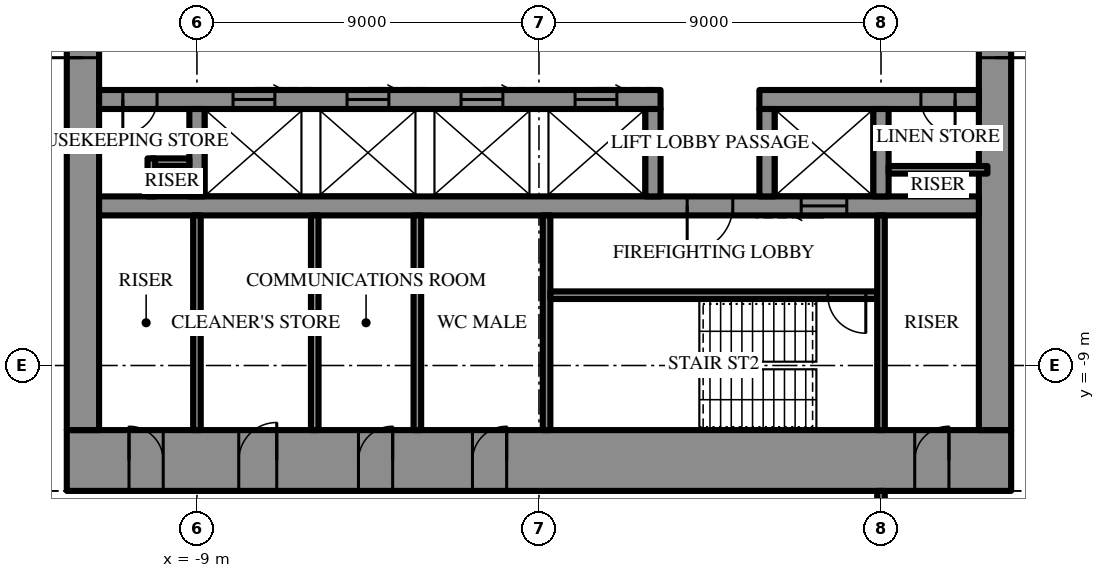
"""IFC4 building model, lengths in metres.
Left out: names, types, materials, properties, quantities, classifications, styles, units other than length and angle.
Written with IfcOpenShell. Run it as: python <this file> out.ifc"""

import sys

from ifc_helpers import new_model, si_unit, direction, frame, frame_2d, origin, place, context, subcontext, project, spatial, rectangle, extrude, element, fill, save


model = new_model("IFC4")
c1 = context("Model", 3, precision=1e-05, world=origin(), true_north=direction((0.0, 1.0)))
c2 = subcontext(c1, "Body", "Model", "MODEL_VIEW")
j1 = project(units=[si_unit("LENGTHUNIT", "METRE"), si_unit("PLANEANGLEUNIT", "RADIAN")], contexts=[c1])
p1 = place(None, origin())
s1 = spatial("IfcSite", under=j1, at=p1, CompositionType="ELEMENT")
p2 = place(p1, origin())
s2 = spatial("IfcBuilding", under=s1, at=p2, CompositionType="ELEMENT")
p3 = place(p2, frame((0.0, 0.0, 311.5)))
s3 = spatial("IfcBuildingStorey", under=s2, at=p3, CompositionType="ELEMENT", Elevation=311.5)
p4 = place(p3, frame((12.425, -11.5, 0.0), z_axis=(0.0, 0.0, 1.0), x_axis=(-1.0, 0.0, 0.0)))
e1 = element("IfcWall", 1, at=p4, inside=s3, PredefinedType="SHEAR", context=c2, shape_type="SweptSolid", body=[
    extrude(rectangle(XDim=24.85, YDim=1.6, at=frame_2d((12.425, 0.0))), origin(), (0.0, 0.0, 1.0), 4.2),
])
p5 = place(p4, frame((13.275, 0.0, 0.0)))
e2 = element("IfcOpeningElement", 2, at=p5, cuts=e1, PredefinedType="OPENING", context=c2, shape_type="SweptSolid", body=[
    extrude(rectangle(XDim=0.9, YDim=2.2, at=frame_2d((0.45, 1.1))), frame((0.0, 0.81, 0.0), z_axis=(0.0, -1.0, 0.0), x_axis=(1.0, 0.0, 0.0)), (0.0, 0.0, 1.0), 1.62),
])
p6 = place(p4, frame((16.275, 0.0, 0.0)))
e3 = element("IfcOpeningElement", 3, at=p6, cuts=e1, PredefinedType="OPENING", context=c2, shape_type="SweptSolid", body=[
    extrude(rectangle(XDim=0.9, YDim=2.2, at=frame_2d((0.45, 1.1))), frame((0.0, 0.81, 0.0), z_axis=(0.0, -1.0, 0.0), x_axis=(1.0, 0.0, 0.0)), (0.0, 0.0, 1.0), 1.62),
])
p7 = place(p4, frame((19.325, 0.0, 0.0)))
e4 = element("IfcOpeningElement", 4, at=p7, cuts=e1, PredefinedType="OPENING", context=c2, shape_type="SweptSolid", body=[
    extrude(rectangle(XDim=1.0, YDim=2.2, at=frame_2d((0.5, 1.1))), frame((0.0, 0.81, 0.0), z_axis=(0.0, -1.0, 0.0), x_axis=(1.0, 0.0, 0.0)), (0.0, 0.0, 1.0), 1.62),
])
p8 = place(p4, frame((1.637, 0.0, 0.0)))
e5 = element("IfcOpeningElement", 5, at=p8, cuts=e1, PredefinedType="OPENING", context=c2, shape_type="SweptSolid", body=[
    extrude(rectangle(XDim=0.9, YDim=2.2, at=frame_2d((0.45, 1.1))), frame((0.0, 0.81, 0.0), z_axis=(0.0, -1.0, 0.0), x_axis=(1.0, 0.0, 0.0)), (0.0, 0.0, 1.0), 1.62),
])
p9 = place(p4, frame((22.312, 0.0, 0.0)))
e6 = element("IfcOpeningElement", 6, at=p9, cuts=e1, PredefinedType="OPENING", context=c2, shape_type="SweptSolid", body=[
    extrude(rectangle(XDim=0.9, YDim=2.2, at=frame_2d((0.45, 1.1))), frame((0.0, 0.81, 0.0), z_axis=(0.0, -1.0, 0.0), x_axis=(1.0, 0.0, 0.0)), (0.0, 0.0, 1.0), 1.62),
])
p10 = place(p3, frame((12.0, -10.7, 0.0), z_axis=(0.0, 0.0, 1.0), x_axis=(0.0, 1.0, 0.0)))
e7 = element("IfcWall", 7, at=p10, inside=s3, PredefinedType="SHEAR", context=c2, shape_type="SweptSolid", body=[
    extrude(rectangle(XDim=21.4, YDim=0.85, at=frame_2d((10.7, 0.0))), origin(), (0.0, 0.0, 1.0), 4.2),
])
p11 = place(p10, frame((9.8, 0.0, 0.0)))
e8 = element("IfcOpeningElement", 8, at=p11, cuts=e7, PredefinedType="OPENING", context=c2, shape_type="SweptSolid", body=[
    extrude(rectangle(XDim=1.8, YDim=2.4, at=frame_2d((0.9, 1.2))), frame((0.0, 0.435, 0.0), z_axis=(0.0, -1.0, 0.0), x_axis=(1.0, 0.0, 0.0)), (0.0, 0.0, 1.0), 0.87),
])
p12 = place(p3, frame((-12.0, 10.7, 0.0), z_axis=(0.0, 0.0, 1.0), x_axis=(0.0, -1.0, 0.0)))
e9 = element("IfcWall", 9, at=p12, inside=s3, PredefinedType="SHEAR", context=c2, shape_type="SweptSolid", body=[
    extrude(rectangle(XDim=21.4, YDim=0.85, at=frame_2d((10.7, 0.0))), origin(), (0.0, 0.0, 1.0), 4.2),
])
p13 = place(p12, frame((9.8, 0.0, 0.0)))
e10 = element("IfcOpeningElement", 10, at=p13, cuts=e9, PredefinedType="OPENING", context=c2, shape_type="SweptSolid", body=[
    extrude(rectangle(XDim=1.8, YDim=2.4, at=frame_2d((0.9, 1.2))), frame((0.0, 0.435, 0.0), z_axis=(0.0, -1.0, 0.0), x_axis=(1.0, 0.0, 0.0)), (0.0, 0.0, 1.0), 0.87),
])
p14 = place(p3, frame((11.575, -2.0, 0.0), z_axis=(0.0, 0.0, 1.0), x_axis=(-1.0, 0.0, 0.0)))
e11 = element("IfcWall", 11, at=p14, inside=s3, PredefinedType="SHEAR", context=c2, shape_type="SweptSolid", body=[
    extrude(rectangle(XDim=5.775, YDim=0.5, at=frame_2d((2.887, 0.0))), origin(), (0.0, 0.0, 1.0), 4.2),
])
p15 = place(p14, frame((0.625, 0.0, 0.0)))
e12 = element("IfcOpeningElement", 12, at=p15, cuts=e11, PredefinedType="OPENING", context=c2, shape_type="SweptSolid", body=[
    extrude(rectangle(XDim=0.9, YDim=2.2, at=frame_2d((0.45, 1.1))), frame((0.0, 0.26, 0.0), z_axis=(0.0, -1.0, 0.0), x_axis=(1.0, 0.0, 0.0)), (0.0, 0.0, 1.0), 0.52),
])
p16 = place(p3, frame((3.2, -2.0, 0.0), z_axis=(0.0, 0.0, 1.0), x_axis=(-1.0, 0.0, 0.0)))
e13 = element("IfcWall", 13, at=p16, inside=s3, PredefinedType="SHEAR", context=c2, shape_type="SweptSolid", body=[
    extrude(rectangle(XDim=14.775, YDim=0.5, at=frame_2d((7.387, 0.0))), origin(), (0.0, 0.0, 1.0), 4.2),
])
p17 = place(p16, frame((13.25, 0.0, 0.0)))
e14 = element("IfcOpeningElement", 14, at=p17, cuts=e13, PredefinedType="OPENING", context=c2, shape_type="SweptSolid", body=[
    extrude(rectangle(XDim=0.9, YDim=2.2, at=frame_2d((0.45, 1.1))), frame((0.0, 0.26, 0.0), z_axis=(0.0, -1.0, 0.0), x_axis=(1.0, 0.0, 0.0)), (0.0, 0.0, 1.0), 0.52),
])
p18 = place(p16, frame((1.15, 0.0, 0.0)))
e15 = element("IfcOpeningElement", 15, at=p18, cuts=e13, PredefinedType="OPENING", context=c2, shape_type="SweptSolid", body=[
    extrude(rectangle(XDim=1.1, YDim=2.2, at=frame_2d((0.55, 1.1))), frame((0.0, 0.26, 0.0), z_axis=(0.0, -1.0, 0.0), x_axis=(1.0, 0.0, 0.0)), (0.0, 0.0, 1.0), 0.52),
])
p19 = place(p16, frame((4.15, 0.0, 0.0)))
e16 = element("IfcOpeningElement", 16, at=p19, cuts=e13, PredefinedType="OPENING", context=c2, shape_type="SweptSolid", body=[
    extrude(rectangle(XDim=1.1, YDim=2.2, at=frame_2d((0.55, 1.1))), frame((0.0, 0.26, 0.0), z_axis=(0.0, -1.0, 0.0), x_axis=(1.0, 0.0, 0.0)), (0.0, 0.0, 1.0), 0.52),
])
p20 = place(p16, frame((7.15, 0.0, 0.0)))
e17 = element("IfcOpeningElement", 17, at=p20, cuts=e13, PredefinedType="OPENING", context=c2, shape_type="SweptSolid", body=[
    extrude(rectangle(XDim=1.1, YDim=2.2, at=frame_2d((0.55, 1.1))), frame((0.0, 0.26, 0.0), z_axis=(0.0, -1.0, 0.0), x_axis=(1.0, 0.0, 0.0)), (0.0, 0.0, 1.0), 0.52),
])
p21 = place(p16, frame((10.15, 0.0, 0.0)))
e18 = element("IfcOpeningElement", 18, at=p21, cuts=e13, PredefinedType="OPENING", context=c2, shape_type="SweptSolid", body=[
    extrude(rectangle(XDim=1.1, YDim=2.2, at=frame_2d((0.55, 1.1))), frame((0.0, 0.26, 0.0), z_axis=(0.0, -1.0, 0.0), x_axis=(1.0, 0.0, 0.0)), (0.0, 0.0, 1.0), 0.52),
])
p22 = place(p3, frame((11.575, -4.8, 0.0), z_axis=(0.0, 0.0, 1.0), x_axis=(-1.0, 0.0, 0.0)))
e19 = element("IfcWall", 19, at=p22, inside=s3, PredefinedType="SHEAR", context=c2, shape_type="SweptSolid", body=[
    extrude(rectangle(XDim=23.15, YDim=0.5, at=frame_2d((11.575, 0.0))), origin(), (0.0, 0.0, 1.0), 4.2),
])
p23 = place(p22, frame((6.475, 0.0, 0.0)))
e20 = element("IfcOpeningElement", 20, at=p23, cuts=e19, PredefinedType="OPENING", context=c2, shape_type="SweptSolid", body=[
    extrude(rectangle(XDim=1.2, YDim=2.2, at=frame_2d((0.6, 1.1))), frame((0.0, 0.26, 0.0), z_axis=(0.0, -1.0, 0.0), x_axis=(1.0, 0.0, 0.0)), (0.0, 0.0, 1.0), 0.52),
])
p24 = place(p22, frame((3.475, 0.0, 0.0)))
e21 = element("IfcOpeningElement", 21, at=p24, cuts=e19, PredefinedType="OPENING", context=c2, shape_type="SweptSolid", body=[
    extrude(rectangle(XDim=1.2, YDim=2.2, at=frame_2d((0.6, 1.1))), frame((0.0, 0.26, 0.0), z_axis=(0.0, -1.0, 0.0), x_axis=(1.0, 0.0, 0.0)), (0.0, 0.0, 1.0), 0.52),
])
for number, where, z_axis, x_axis in (
    (22, (9.0, -2.25, 0.0), (0.0, 0.0, 1.0), (0.0, -1.0, 0.0)),
    (23, (6.0, -2.25, 0.0), (0.0, 0.0, 1.0), (0.0, -1.0, 0.0)),
    (24, (3.0, -2.25, 0.0), (0.0, 0.0, 1.0), (0.0, -1.0, 0.0)),
    (25, (-9.0, -2.25, 0.0), (0.0, 0.0, 1.0), (0.0, -1.0, 0.0)),
):
    element("IfcWall", number, at=place(p3, frame(where, z_axis=z_axis, x_axis=x_axis)), inside=s3, PredefinedType="SHEAR", context=c2, shape_type="SweptSolid", body=[
        extrude(rectangle(XDim=2.3, YDim=0.4, at=frame_2d((1.15, 0.0))), origin(), (0.0, 0.0, 1.0), 4.2),
    ])
p25 = place(p3, frame((0.2, -5.05, 0.0), z_axis=(0.0, 0.0, 1.0), x_axis=(0.0, -1.0, 0.0)))
e26 = element("IfcWall", 26, at=p25, inside=s3, PredefinedType="SHEAR", context=c2, shape_type="SweptSolid", body=[
    extrude(rectangle(XDim=5.65, YDim=0.2, at=frame_2d((2.825, 0.0))), origin(), (0.0, 0.0, 1.0), 4.2),
])
p26 = place(p3, frame((8.9, -7.15, 0.0), z_axis=(0.0, 0.0, 1.0), x_axis=(-1.0, 0.0, 0.0)))
e27 = element("IfcWall", 27, at=p26, inside=s3, PredefinedType="SHEAR", context=c2, shape_type="SweptSolid", body=[
    extrude(rectangle(XDim=8.6, YDim=0.2, at=frame_2d((4.3, 0.0))), origin(), (0.0, 0.0, 1.0), 4.2),
])
p27 = place(p26, frame((0.3, 0.0, 0.0)))
e28 = element("IfcOpeningElement", 28, at=p27, cuts=e27, PredefinedType="OPENING", context=c2, shape_type="SweptSolid", body=[
    extrude(rectangle(XDim=1.0, YDim=2.2, at=frame_2d((0.5, 1.1))), frame((0.0, 0.11, 0.0), z_axis=(0.0, -1.0, 0.0), x_axis=(1.0, 0.0, 0.0)), (0.0, 0.0, 1.0), 0.22),
])
for number, where, z_axis, x_axis in (
    (29, (9.0, -5.05, 0.0), (0.0, 0.0, 1.0), (0.0, -1.0, 0.0)),
    (30, (-9.0, -5.05, 0.0), (0.0, 0.0, 1.0), (0.0, -1.0, 0.0)),
    (31, (-3.2, -5.05, 0.0), (0.0, 0.0, 1.0), (0.0, -1.0, 0.0)),
    (32, (-5.9, -5.05, 0.0), (0.0, 0.0, 1.0), (0.0, -1.0, 0.0)),
):
    element("IfcWall", number, at=place(p3, frame(where, z_axis=z_axis, x_axis=x_axis)), inside=s3, PredefinedType="PARTITIONING", context=c2, shape_type="SweptSolid", body=[
        extrude(rectangle(XDim=5.65, YDim=0.2, at=frame_2d((2.825, 0.0))), origin(), (0.0, 0.0, 1.0), 4.0),
    ])
p28 = place(p3, frame((11.8, -3.85, 0.0), z_axis=(0.0, 0.0, 1.0), x_axis=(-1.0, 0.0, 0.0)))
e33 = element("IfcWall", 33, at=p28, inside=s3, PredefinedType="PARTITIONING", context=c2, shape_type="SweptSolid", body=[
    extrude(rectangle(XDim=2.6, YDim=0.2, at=frame_2d((1.3, 0.0))), origin(), (0.0, 0.0, 1.0), 4.0),
])
for number, where, z_axis, x_axis in (
    (34, (-9.2, -3.65, 0.0), (0.0, 0.0, 1.0), (-1.0, 0.0, 0.0)),
    (35, (-10.2, -3.55, 0.0), (0.0, 0.0, 1.0), (0.0, -1.0, 0.0)),
):
    element("IfcWall", number, at=place(p3, frame(where, z_axis=z_axis, x_axis=x_axis)), inside=s3, PredefinedType="PARTITIONING", context=c2, shape_type="SweptSolid", body=[
        extrude(rectangle(XDim=1.0, YDim=0.2, at=frame_2d((0.5, 0.0))), origin(), (0.0, 0.0, 1.0), 4.0),
    ])
p29 = place(p3, frame((9.0, -12.3, 0.0), z_axis=(0.0, 0.0, 1.0), x_axis=(0.0, -1.0, 0.0)))
e36 = element("IfcWall", 36, at=p29, inside=s3, PredefinedType="PARTITIONING", context=c2, shape_type="SweptSolid", body=[
    extrude(rectangle(XDim=13.05, YDim=0.2, at=frame_2d((6.525, 0.0))), origin(), (0.0, 0.0, 1.0), 4.0),
])
p30 = place(p29, frame((0.805, 0.0, 0.0)))
e37 = element("IfcOpeningElement", 37, at=p30, cuts=e36, PredefinedType="OPENING", context=c2, shape_type="SweptSolid", body=[
    extrude(rectangle(XDim=1.0, YDim=2.2, at=frame_2d((0.5, 1.1))), frame((0.0, 0.11, 0.0), z_axis=(0.0, -1.0, 0.0), x_axis=(1.0, 0.0, 0.0)), (0.0, 0.0, 1.0), 0.22),
])
p31 = place(p11, frame((1.8, 0.0, 0.0), z_axis=(0.0, 0.0, 1.0), x_axis=(-1.0, 0.0, 0.0)))
e38 = element("IfcDoor", 38, at=p31, inside=s3, OperationType="DOUBLE_DOOR_SINGLE_SWING", PredefinedType="DOOR", context=c2, shape_type="SweptSolid", body=[
    extrude(rectangle(XDim=1.8, YDim=2.4, at=frame_2d((0.9, 1.2))), frame((0.0, 0.025, 0.0), z_axis=(0.0, -1.0, 0.0), x_axis=(1.0, 0.0, 0.0)), (0.0, 0.0, 1.0), 0.05),
])
fill(e8, e38)
p32 = place(p13, frame((1.8, 0.0, 0.0), z_axis=(0.0, 0.0, 1.0), x_axis=(-1.0, 0.0, 0.0)))
e39 = element("IfcDoor", 39, at=p32, inside=s3, OperationType="DOUBLE_DOOR_SINGLE_SWING", PredefinedType="DOOR", context=c2, shape_type="SweptSolid", body=[
    extrude(rectangle(XDim=1.8, YDim=2.4, at=frame_2d((0.9, 1.2))), frame((0.0, 0.025, 0.0), z_axis=(0.0, -1.0, 0.0), x_axis=(1.0, 0.0, 0.0)), (0.0, 0.0, 1.0), 0.05),
])
fill(e10, e39)
p33 = place(p23, origin())
e40 = element("IfcDoor", 40, at=p33, inside=s3, OperationType="SINGLE_SWING_LEFT", PredefinedType="DOOR", context=c2, shape_type="SweptSolid", body=[
    extrude(rectangle(XDim=1.2, YDim=2.2, at=frame_2d((0.6, 1.1))), frame((0.0, 0.025, 0.0), z_axis=(0.0, -1.0, 0.0), x_axis=(1.0, 0.0, 0.0)), (0.0, 0.0, 1.0), 0.05),
])
fill(e20, e40)
p34 = place(p27, origin())
e41 = element("IfcDoor", 41, at=p34, inside=s3, OperationType="SINGLE_SWING_RIGHT", PredefinedType="DOOR", context=c2, shape_type="SweptSolid", body=[
    extrude(rectangle(XDim=1.0, YDim=2.2, at=frame_2d((0.5, 1.1))), frame((0.0, 0.025, 0.0), z_axis=(0.0, -1.0, 0.0), x_axis=(1.0, 0.0, 0.0)), (0.0, 0.0, 1.0), 0.05),
])
fill(e28, e41)
p35 = place(p5, frame((0.9, 0.0, 0.0), z_axis=(0.0, 0.0, 1.0), x_axis=(-1.0, 0.0, 0.0)))
e42 = element("IfcDoor", 42, at=p35, inside=s3, OperationType="SINGLE_SWING_LEFT", PredefinedType="DOOR", context=c2, shape_type="SweptSolid", body=[
    extrude(rectangle(XDim=0.9, YDim=2.2, at=frame_2d((0.45, 1.1))), frame((0.0, 0.025, 0.0), z_axis=(0.0, -1.0, 0.0), x_axis=(1.0, 0.0, 0.0)), (0.0, 0.0, 1.0), 0.05),
])
fill(e2, e42)
p36 = place(p6, frame((0.9, 0.0, 0.0), z_axis=(0.0, 0.0, 1.0), x_axis=(-1.0, 0.0, 0.0)))
e43 = element("IfcDoor", 43, at=p36, inside=s3, OperationType="SINGLE_SWING_LEFT", PredefinedType="DOOR", context=c2, shape_type="SweptSolid", body=[
    extrude(rectangle(XDim=0.9, YDim=2.2, at=frame_2d((0.45, 1.1))), frame((0.0, 0.025, 0.0), z_axis=(0.0, -1.0, 0.0), x_axis=(1.0, 0.0, 0.0)), (0.0, 0.0, 1.0), 0.05),
])
fill(e3, e43)
p37 = place(p7, frame((1.0, 0.0, 0.0), z_axis=(0.0, 0.0, 1.0), x_axis=(-1.0, 0.0, 0.0)))
e44 = element("IfcDoor", 44, at=p37, inside=s3, OperationType="SINGLE_SWING_LEFT", PredefinedType="DOOR", context=c2, shape_type="SweptSolid", body=[
    extrude(rectangle(XDim=1.0, YDim=2.2, at=frame_2d((0.5, 1.1))), frame((0.0, 0.025, 0.0), z_axis=(0.0, -1.0, 0.0), x_axis=(1.0, 0.0, 0.0)), (0.0, 0.0, 1.0), 0.05),
])
fill(e4, e44)
p38 = place(p8, frame((0.9, 0.0, 0.0), z_axis=(0.0, 0.0, 1.0), x_axis=(-1.0, 0.0, 0.0)))
e45 = element("IfcDoor", 45, at=p38, inside=s3, OperationType="SINGLE_SWING_LEFT", PredefinedType="DOOR", context=c2, shape_type="SweptSolid", body=[
    extrude(rectangle(XDim=0.9, YDim=2.2, at=frame_2d((0.45, 1.1))), frame((0.0, 0.025, 0.0), z_axis=(0.0, -1.0, 0.0), x_axis=(1.0, 0.0, 0.0)), (0.0, 0.0, 1.0), 0.05),
])
fill(e5, e45)
p39 = place(p9, frame((0.9, 0.0, 0.0), z_axis=(0.0, 0.0, 1.0), x_axis=(-1.0, 0.0, 0.0)))
e46 = element("IfcDoor", 46, at=p39, inside=s3, OperationType="SINGLE_SWING_RIGHT", PredefinedType="DOOR", context=c2, shape_type="SweptSolid", body=[
    extrude(rectangle(XDim=0.9, YDim=2.2, at=frame_2d((0.45, 1.1))), frame((0.0, 0.025, 0.0), z_axis=(0.0, -1.0, 0.0), x_axis=(1.0, 0.0, 0.0)), (0.0, 0.0, 1.0), 0.05),
])
fill(e6, e46)
p40 = place(p15, origin())
e47 = element("IfcDoor", 47, at=p40, inside=s3, OperationType="SINGLE_SWING_RIGHT", PredefinedType="DOOR", context=c2, shape_type="SweptSolid", body=[
    extrude(rectangle(XDim=0.9, YDim=2.2, at=frame_2d((0.45, 1.1))), frame((0.0, 0.025, 0.0), z_axis=(0.0, -1.0, 0.0), x_axis=(1.0, 0.0, 0.0)), (0.0, 0.0, 1.0), 0.05),
])
fill(e12, e47)
p41 = place(p17, origin())
e48 = element("IfcDoor", 48, at=p41, inside=s3, OperationType="SINGLE_SWING_LEFT", PredefinedType="DOOR", context=c2, shape_type="SweptSolid", body=[
    extrude(rectangle(XDim=0.9, YDim=2.2, at=frame_2d((0.45, 1.1))), frame((0.0, 0.025, 0.0), z_axis=(0.0, -1.0, 0.0), x_axis=(1.0, 0.0, 0.0)), (0.0, 0.0, 1.0), 0.05),
])
fill(e14, e48)
p42 = place(p24, origin())
e49 = element("IfcDoor", 49, at=p42, inside=s3, OperationType="SLIDING_TO_LEFT", PredefinedType="DOOR", context=c2, shape_type="SweptSolid", body=[
    extrude(rectangle(XDim=1.2, YDim=2.2, at=frame_2d((0.6, 1.1))), frame((0.0, 0.025, 0.0), z_axis=(0.0, -1.0, 0.0), x_axis=(1.0, 0.0, 0.0)), (0.0, 0.0, 1.0), 0.05),
])
fill(e21, e49)
p43 = place(p18, frame((1.1, 0.0, 0.0), z_axis=(0.0, 0.0, 1.0), x_axis=(-1.0, 0.0, 0.0)))
e50 = element("IfcDoor", 50, at=p43, inside=s3, OperationType="SLIDING_TO_LEFT", PredefinedType="DOOR", context=c2, shape_type="SweptSolid", body=[
    extrude(rectangle(XDim=1.1, YDim=2.2, at=frame_2d((0.55, 1.1))), frame((0.0, 0.025, 0.0), z_axis=(0.0, -1.0, 0.0), x_axis=(1.0, 0.0, 0.0)), (0.0, 0.0, 1.0), 0.05),
])
fill(e15, e50)
p44 = place(p19, frame((1.1, 0.0, 0.0), z_axis=(0.0, 0.0, 1.0), x_axis=(-1.0, 0.0, 0.0)))
e51 = element("IfcDoor", 51, at=p44, inside=s3, OperationType="SLIDING_TO_LEFT", PredefinedType="DOOR", context=c2, shape_type="SweptSolid", body=[
    extrude(rectangle(XDim=1.1, YDim=2.2, at=frame_2d((0.55, 1.1))), frame((0.0, 0.025, 0.0), z_axis=(0.0, -1.0, 0.0), x_axis=(1.0, 0.0, 0.0)), (0.0, 0.0, 1.0), 0.05),
])
fill(e16, e51)
p45 = place(p20, frame((1.1, 0.0, 0.0), z_axis=(0.0, 0.0, 1.0), x_axis=(-1.0, 0.0, 0.0)))
e52 = element("IfcDoor", 52, at=p45, inside=s3, OperationType="SLIDING_TO_LEFT", PredefinedType="DOOR", context=c2, shape_type="SweptSolid", body=[
    extrude(rectangle(XDim=1.1, YDim=2.2, at=frame_2d((0.55, 1.1))), frame((0.0, 0.025, 0.0), z_axis=(0.0, -1.0, 0.0), x_axis=(1.0, 0.0, 0.0)), (0.0, 0.0, 1.0), 0.05),
])
fill(e17, e52)
p46 = place(p21, frame((1.1, 0.0, 0.0), z_axis=(0.0, 0.0, 1.0), x_axis=(-1.0, 0.0, 0.0)))
e53 = element("IfcDoor", 53, at=p46, inside=s3, OperationType="SLIDING_TO_LEFT", PredefinedType="DOOR", context=c2, shape_type="SweptSolid", body=[
    extrude(rectangle(XDim=1.1, YDim=2.2, at=frame_2d((0.55, 1.1))), frame((0.0, 0.025, 0.0), z_axis=(0.0, -1.0, 0.0), x_axis=(1.0, 0.0, 0.0)), (0.0, 0.0, 1.0), 0.05),
])
fill(e18, e53)
save(model, sys.argv[1])
